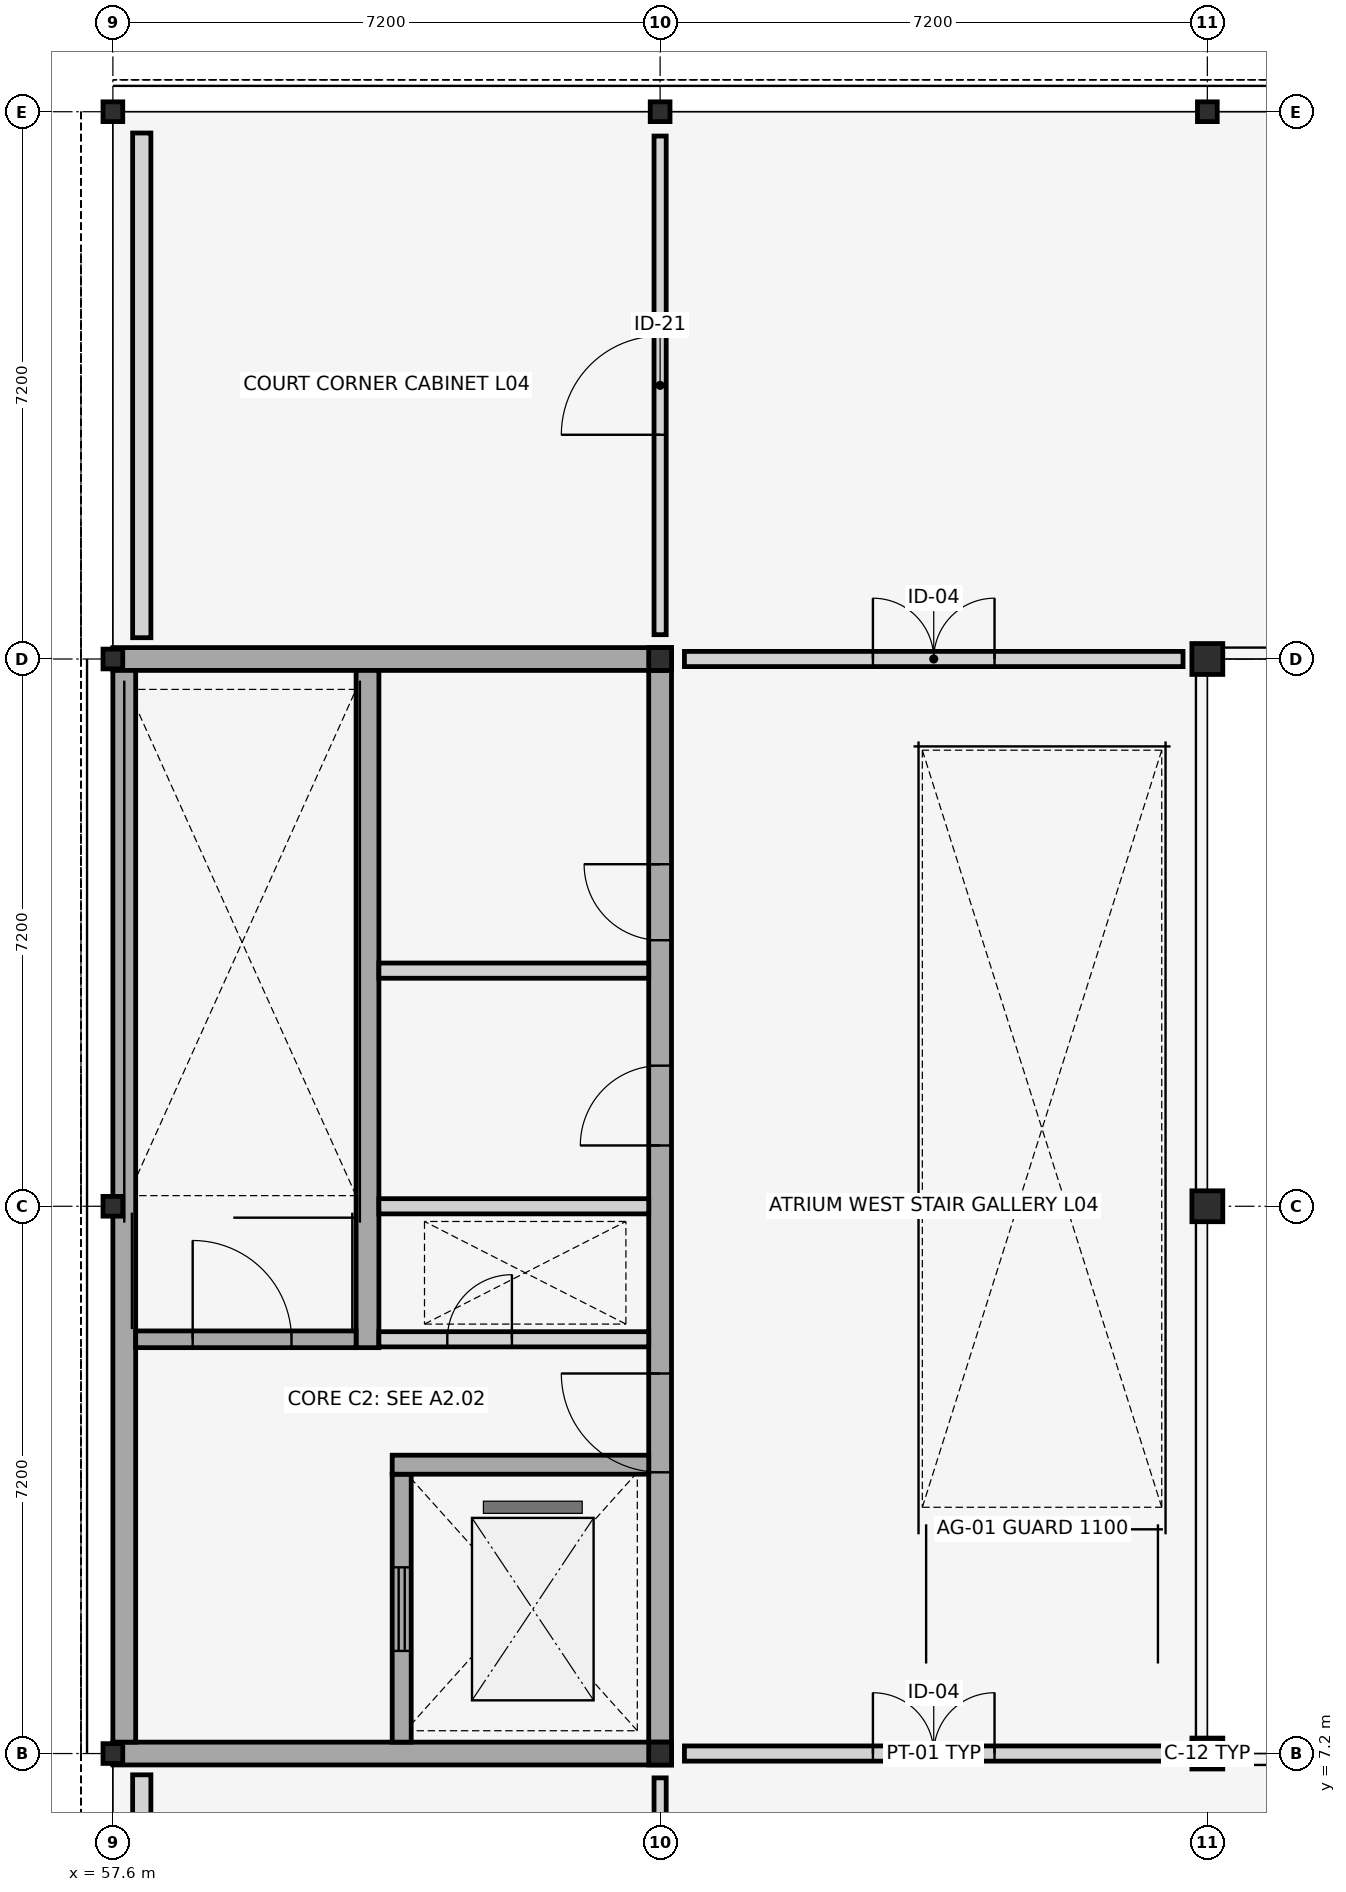
"""IFC4 building model, lengths in metres.
Left out: names, types, materials, properties, quantities, classifications, styles, units other than length and angle.
Written with IfcOpenShell. Run it as: python <this file> out.ifc"""

import sys

from ifc_helpers import new_model, si_unit, direction, frame, frame_2d, origin, origin_2d, place, context, subcontext, project, spatial, rectangle, hollow_circle, i_section, extrude, element, fill, save


model = new_model("IFC4")
c1 = context("Model", 3, precision=1e-05, world=origin(), true_north=direction((0.0, 1.0)))
c2 = subcontext(c1, "Body", "Model", "MODEL_VIEW")
j1 = project(units=[si_unit("LENGTHUNIT", "METRE"), si_unit("PLANEANGLEUNIT", "RADIAN")], contexts=[c1])
p1 = place(None, origin())
s1 = spatial("IfcSite", under=j1, at=p1, CompositionType="ELEMENT")
p2 = place(p1, origin())
s2 = spatial("IfcBuilding", under=s1, at=p2, CompositionType="ELEMENT")
p3 = place(p2, frame((0.0, 0.0, 17.1)))
s3 = spatial("IfcBuildingStorey", under=s2, at=p3, CompositionType="ELEMENT", Elevation=17.1)
for number, where, z_axis, x_axis in (
    (1, (57.6, 7.2, 0.0), (0.0, 0.0, 1.0), (0.0, 1.0, 0.0)),
    (2, (57.6, 14.4, 0.0), (0.0, 0.0, 1.0), (1.0, 0.0, 0.0)),
    (3, (57.6, 21.6, 0.0), (0.0, 0.0, 1.0), (0.0, 1.0, 0.0)),
    (4, (57.6, 28.8, 0.0), (0.0, 0.0, 1.0), (1.0, 0.0, 0.0)),
):
    element("IfcColumn", number, at=place(p3, frame(where, z_axis=z_axis, x_axis=x_axis)), inside=s3, PredefinedType="COLUMN", context=c2, shape_type="SweptSolid", body=[
        extrude(i_section(OverallWidth=0.26, OverallDepth=0.26, WebThickness=0.01, FlangeThickness=0.018, FilletRadius=0.024, at=origin_2d()), origin(), (0.0, 0.0, 1.0), 8.1),
    ])
for number, where, z_axis, x_axis in (
    (5, (64.8, 7.2, 0.0), (0.0, 0.0, 1.0), (1.0, 0.0, 0.0)),
    (6, (64.8, 21.6, 0.0), (0.0, 0.0, 1.0), (1.0, 0.0, 0.0)),
):
    element("IfcColumn", number, at=place(p3, frame(where, z_axis=z_axis, x_axis=x_axis)), inside=s3, PredefinedType="COLUMN", context=c2, shape_type="SweptSolid", body=[
        extrude(i_section(OverallWidth=0.3, OverallDepth=0.3, WebThickness=0.011, FlangeThickness=0.019, FilletRadius=0.027, at=origin_2d()), origin(), (0.0, 0.0, 1.0), 8.1),
    ])
p4 = place(p3, frame((64.8, 28.8, 0.0), z_axis=(0.0, 0.0, 1.0), x_axis=(0.0, 1.0, 0.0)))
e7 = element("IfcColumn", 7, at=p4, inside=s3, PredefinedType="COLUMN", context=c2, shape_type="SweptSolid", body=[
    extrude(i_section(OverallWidth=0.26, OverallDepth=0.26, WebThickness=0.01, FlangeThickness=0.018, FilletRadius=0.024, at=origin_2d()), origin(), (0.0, 0.0, 1.0), 8.1),
])
for number, where, z_axis, x_axis in (
    (8, (72.0, 7.2, 0.0), (0.0, 0.0, 1.0), (0.0, 1.0, 0.0)),
    (9, (72.0, 14.4, 0.0), (0.0, 0.0, 1.0), (1.0, 0.0, 0.0)),
    (10, (72.0, 21.6, 0.0), (0.0, 0.0, 1.0), (0.0, 1.0, 0.0)),
):
    element("IfcColumn", number, at=place(p3, frame(where, z_axis=z_axis, x_axis=x_axis)), inside=s3, PredefinedType="COLUMN", context=c2, shape_type="SweptSolid", body=[
        extrude(hollow_circle(Radius=0.203, WallThickness=0.016, at=origin_2d()), origin(), (0.0, 0.0, 1.0), 8.1),
    ])
p5 = place(p3, frame((72.0, 28.8, 0.0), z_axis=(0.0, 0.0, 1.0), x_axis=(1.0, 0.0, 0.0)))
e11 = element("IfcColumn", 11, at=p5, inside=s3, PredefinedType="COLUMN", context=c2, shape_type="SweptSolid", body=[
    extrude(i_section(OverallWidth=0.26, OverallDepth=0.26, WebThickness=0.01, FlangeThickness=0.018, FilletRadius=0.024, at=origin_2d()), origin(), (0.0, 0.0, 1.0), 8.1),
])
p6 = place(p3, frame((57.98, 28.52, 0.0), z_axis=(0.0, 0.0, 1.0), x_axis=(0.0, -1.0, 0.0)))
e12 = element("IfcWall", 12, at=p6, inside=s3, PredefinedType="STANDARD", context=c2, shape_type="SweptSolid", body=[
    extrude(rectangle(XDim=6.64, YDim=0.24, at=frame_2d((3.32, 0.0))), origin(), (0.0, 0.0, 1.0), 7.48),
])
p7 = place(p3, frame((57.98, 6.92, 0.0), z_axis=(0.0, 0.0, 1.0), x_axis=(0.0, -1.0, 0.0)))
e13 = element("IfcWall", 13, at=p7, inside=s3, PredefinedType="STANDARD", context=c2, shape_type="SweptSolid", body=[
    extrude(rectangle(XDim=6.64, YDim=0.24, at=frame_2d((3.32, 0.0))), origin(), (0.0, 0.0, 1.0), 7.48),
])
for number, where, z_axis, x_axis in (
    (14, (57.6, 7.2, 0.0), (0.0, 0.0, 1.0), (1.0, 0.0, 0.0)),
    (15, (57.6, 21.6, 0.0), (0.0, 0.0, 1.0), (1.0, 0.0, 0.0)),
):
    element("IfcWall", number, at=place(p3, frame(where, z_axis=z_axis, x_axis=x_axis)), inside=s3, PredefinedType="SHEAR", context=c2, shape_type="SweptSolid", body=[
        extrude(rectangle(XDim=7.35, YDim=0.3, at=frame_2d((3.675, 0.0))), origin(), (0.0, 0.0, 1.0), 7.88),
    ])
p8 = place(p3, frame((57.75, 7.35, 0.0), z_axis=(0.0, 0.0, 1.0), x_axis=(0.0, 1.0, 0.0)))
e16 = element("IfcWall", 16, at=p8, inside=s3, PredefinedType="SHEAR", context=c2, shape_type="SweptSolid", body=[
    extrude(rectangle(XDim=14.1, YDim=0.3, at=frame_2d((7.05, 0.0))), origin(), (0.0, 0.0, 1.0), 7.88),
])
p9 = place(p3, frame((64.8, 7.35, 0.0), z_axis=(0.0, 0.0, 1.0), x_axis=(0.0, 1.0, 0.0)))
e17 = element("IfcWall", 17, at=p9, inside=s3, PredefinedType="SHEAR", context=c2, shape_type="SweptSolid", body=[
    extrude(rectangle(XDim=14.1, YDim=0.3, at=frame_2d((7.05, 0.0))), origin(), (0.0, 0.0, 1.0), 7.88),
])
p10 = place(p9, frame((3.55, 0.0, 0.0)))
e18 = element("IfcOpeningElement", 18, at=p10, cuts=e17, PredefinedType="OPENING", context=c2, shape_type="SweptSolid", body=[
    extrude(rectangle(XDim=1.3, YDim=2.2, at=frame_2d((0.65, 1.1))), frame((0.0, 0.16, 0.0), z_axis=(0.0, -1.0, 0.0), x_axis=(1.0, 0.0, 0.0)), (0.0, 0.0, 1.0), 0.32),
])
p11 = place(p9, frame((7.85, 0.0, 0.0)))
e19 = element("IfcOpeningElement", 19, at=p11, cuts=e17, PredefinedType="OPENING", context=c2, shape_type="SweptSolid", body=[
    extrude(rectangle(XDim=1.05, YDim=2.15, at=frame_2d((0.525, 1.075))), frame((0.0, 0.16, 0.0), z_axis=(0.0, -1.0, 0.0), x_axis=(1.0, 0.0, 0.0)), (0.0, 0.0, 1.0), 0.32),
])
p12 = place(p9, frame((10.55, 0.0, 0.0)))
e20 = element("IfcOpeningElement", 20, at=p12, cuts=e17, PredefinedType="OPENING", context=c2, shape_type="SweptSolid", body=[
    extrude(rectangle(XDim=1.0, YDim=2.15, at=frame_2d((0.5, 1.075))), frame((0.0, 0.16, 0.0), z_axis=(0.0, -1.0, 0.0), x_axis=(1.0, 0.0, 0.0)), (0.0, 0.0, 1.0), 0.32),
])
p13 = place(p3, frame((61.4, 7.35, 0.0), z_axis=(0.0, 0.0, 1.0), x_axis=(0.0, 1.0, 0.0)))
e21 = element("IfcWall", 21, at=p13, inside=s3, PredefinedType="SHEAR", context=c2, shape_type="SweptSolid", body=[
    extrude(rectangle(XDim=3.525, YDim=0.25, at=frame_2d((1.762, 0.0))), origin(), (0.0, 0.0, 1.0), 7.88),
])
p14 = place(p13, frame((1.2, 0.0, 0.0)))
e22 = element("IfcOpeningElement", 22, at=p14, cuts=e21, PredefinedType="OPENING", context=c2, shape_type="SweptSolid", body=[
    extrude(rectangle(XDim=1.1, YDim=2.15, at=frame_2d((0.55, 1.075))), frame((0.0, 0.135, 0.0), z_axis=(0.0, -1.0, 0.0), x_axis=(1.0, 0.0, 0.0)), (0.0, 0.0, 1.0), 0.27),
])
p15 = place(p3, frame((60.95, 12.54, 0.0), z_axis=(0.0, 0.0, 1.0), x_axis=(0.0, 1.0, 0.0)))
e23 = element("IfcWall", 23, at=p15, inside=s3, PredefinedType="SHEAR", context=c2, shape_type="SweptSolid", body=[
    extrude(rectangle(XDim=8.91, YDim=0.3, at=frame_2d((4.455, 0.0))), origin(), (0.0, 0.0, 1.0), 7.88),
])
p16 = place(p3, frame((61.1, 12.65, 0.0), z_axis=(0.0, 0.0, 1.0), x_axis=(1.0, 0.0, 0.0)))
e24 = element("IfcWall", 24, at=p16, inside=s3, PredefinedType="PLUMBINGWALL", context=c2, shape_type="SweptSolid", body=[
    extrude(rectangle(XDim=3.55, YDim=0.2, at=frame_2d((1.775, 0.0))), origin(), (0.0, 0.0, 1.0), 7.3),
])
p17 = place(p16, frame((0.9, 0.0, 0.0)))
e25 = element("IfcOpeningElement", 25, at=p17, cuts=e24, PredefinedType="OPENING", context=c2, shape_type="SweptSolid", body=[
    extrude(rectangle(XDim=0.85, YDim=2.05, at=frame_2d((0.425, 1.025))), frame((0.0, 0.11, 0.0), z_axis=(0.0, -1.0, 0.0), x_axis=(1.0, 0.0, 0.0)), (0.0, 0.0, 1.0), 0.22),
])
p18 = place(p3, frame((57.9, 12.65, 0.0), z_axis=(0.0, 0.0, 1.0), x_axis=(1.0, 0.0, 0.0)))
e26 = element("IfcWall", 26, at=p18, inside=s3, PredefinedType="SHEAR", context=c2, shape_type="SweptSolid", body=[
    extrude(rectangle(XDim=2.9, YDim=0.22, at=frame_2d((1.45, 0.0))), origin(), (0.0, 0.0, 1.0), 7.88),
])
p19 = place(p18, frame((0.75, 0.0, 0.0)))
e27 = element("IfcOpeningElement", 27, at=p19, cuts=e26, PredefinedType="OPENING", context=c2, shape_type="SweptSolid", body=[
    extrude(rectangle(XDim=1.3, YDim=2.2, at=frame_2d((0.65, 1.1))), frame((0.0, 0.12, 0.0), z_axis=(0.0, -1.0, 0.0), x_axis=(1.0, 0.0, 0.0)), (0.0, 0.0, 1.0), 0.24),
])
p20 = place(p3, frame((61.275, 11.0, 0.0), z_axis=(0.0, 0.0, 1.0), x_axis=(1.0, 0.0, 0.0)))
e28 = element("IfcWall", 28, at=p20, inside=s3, PredefinedType="SHEAR", context=c2, shape_type="SweptSolid", body=[
    extrude(rectangle(XDim=3.375, YDim=0.25, at=frame_2d((1.688, 0.0))), origin(), (0.0, 0.0, 1.0), 7.88),
])
for number, where, z_axis, x_axis in (
    (29, (61.1, 14.4, 0.0), (0.0, 0.0, 1.0), (1.0, 0.0, 0.0)),
    (30, (61.1, 17.5, 0.0), (0.0, 0.0, 1.0), (1.0, 0.0, 0.0)),
):
    element("IfcWall", number, at=place(p3, frame(where, z_axis=z_axis, x_axis=x_axis)), inside=s3, PredefinedType="PLUMBINGWALL", context=c2, shape_type="SweptSolid", body=[
        extrude(rectangle(XDim=3.55, YDim=0.2, at=frame_2d((1.775, 0.0))), origin(), (0.0, 0.0, 1.0), 7.3),
    ])
p21 = place(p3, frame((65.12, 7.2, 0.0), z_axis=(0.0, 0.0, 1.0), x_axis=(1.0, 0.0, 0.0)))
e31 = element("IfcWall", 31, at=p21, inside=s3, PredefinedType="PARTITIONING", context=c2, shape_type="SweptSolid", body=[
    extrude(rectangle(XDim=6.56, YDim=0.2, at=frame_2d((3.28, 0.0))), origin(), (0.0, 0.0, 1.0), 7.05),
])
p22 = place(p21, frame((2.48, 0.0, 0.0)))
e32 = element("IfcOpeningElement", 32, at=p22, cuts=e31, PredefinedType="OPENING", context=c2, shape_type="SweptSolid", body=[
    extrude(rectangle(XDim=1.6, YDim=2.35, at=frame_2d((0.8, 1.175))), frame((0.0, 0.11, 0.0), z_axis=(0.0, -1.0, 0.0), x_axis=(1.0, 0.0, 0.0)), (0.0, 0.0, 1.0), 0.22),
])
p23 = place(p3, frame((65.12, 21.6, 0.0), z_axis=(0.0, 0.0, 1.0), x_axis=(1.0, 0.0, 0.0)))
e33 = element("IfcWall", 33, at=p23, inside=s3, PredefinedType="PARTITIONING", context=c2, shape_type="SweptSolid", body=[
    extrude(rectangle(XDim=6.56, YDim=0.2, at=frame_2d((3.28, 0.0))), origin(), (0.0, 0.0, 1.0), 7.05),
])
p24 = place(p23, frame((2.48, 0.0, 0.0)))
e34 = element("IfcOpeningElement", 34, at=p24, cuts=e33, PredefinedType="OPENING", context=c2, shape_type="SweptSolid", body=[
    extrude(rectangle(XDim=1.6, YDim=2.35, at=frame_2d((0.8, 1.175))), frame((0.0, 0.11, 0.0), z_axis=(0.0, -1.0, 0.0), x_axis=(1.0, 0.0, 0.0)), (0.0, 0.0, 1.0), 0.22),
])
p25 = place(p3, frame((64.8, 0.32, 0.0), z_axis=(0.0, 0.0, 1.0), x_axis=(0.0, 1.0, 0.0)))
e35 = element("IfcWall", 35, at=p25, inside=s3, PredefinedType="PARTITIONING", context=c2, shape_type="SweptSolid", body=[
    extrude(rectangle(XDim=6.56, YDim=0.16, at=frame_2d((3.28, 0.0))), origin(), (0.0, 0.0, 1.0), 7.05),
])
p26 = place(p25, frame((2.73, 0.0, 0.0)))
e36 = element("IfcOpeningElement", 36, at=p26, cuts=e35, PredefinedType="OPENING", context=c2, shape_type="SweptSolid", body=[
    extrude(rectangle(XDim=1.1, YDim=2.35, at=frame_2d((0.55, 1.175))), frame((0.0, 0.09, 0.0), z_axis=(0.0, -1.0, 0.0), x_axis=(1.0, 0.0, 0.0)), (0.0, 0.0, 1.0), 0.18),
])
p27 = place(p3, frame((64.8, 21.92, 0.0), z_axis=(0.0, 0.0, 1.0), x_axis=(0.0, 1.0, 0.0)))
e37 = element("IfcWall", 37, at=p27, inside=s3, PredefinedType="PARTITIONING", context=c2, shape_type="SweptSolid", body=[
    extrude(rectangle(XDim=6.56, YDim=0.16, at=frame_2d((3.28, 0.0))), origin(), (0.0, 0.0, 1.0), 7.05),
])
p28 = place(p27, frame((2.63, 0.0, 0.0)))
e38 = element("IfcOpeningElement", 38, at=p28, cuts=e37, PredefinedType="OPENING", context=c2, shape_type="SweptSolid", body=[
    extrude(rectangle(XDim=1.3, YDim=2.45, at=frame_2d((0.65, 1.225))), frame((0.0, 0.09, 0.0), z_axis=(0.0, -1.0, 0.0), x_axis=(1.0, 0.0, 0.0)), (0.0, 0.0, 1.0), 0.18),
])
p29 = place(p10, origin())
e39 = element("IfcDoor", 39, at=p29, inside=s3, OperationType="SINGLE_SWING_RIGHT", PredefinedType="DOOR", context=c2, shape_type="SweptSolid", body=[
    extrude(rectangle(XDim=1.3, YDim=2.2, at=frame_2d((0.65, 1.1))), frame((0.0, 0.025, 0.0), z_axis=(0.0, -1.0, 0.0), x_axis=(1.0, 0.0, 0.0)), (0.0, 0.0, 1.0), 0.05),
])
fill(e18, e39)
p30 = place(p11, origin())
e40 = element("IfcDoor", 40, at=p30, inside=s3, OperationType="SINGLE_SWING_LEFT", PredefinedType="DOOR", context=c2, shape_type="SweptSolid", body=[
    extrude(rectangle(XDim=1.05, YDim=2.15, at=frame_2d((0.525, 1.075))), frame((0.0, 0.025, 0.0), z_axis=(0.0, -1.0, 0.0), x_axis=(1.0, 0.0, 0.0)), (0.0, 0.0, 1.0), 0.05),
])
fill(e19, e40)
p31 = place(p12, origin())
e41 = element("IfcDoor", 41, at=p31, inside=s3, OperationType="SINGLE_SWING_RIGHT", PredefinedType="DOOR", context=c2, shape_type="SweptSolid", body=[
    extrude(rectangle(XDim=1.0, YDim=2.15, at=frame_2d((0.5, 1.075))), frame((0.0, 0.025, 0.0), z_axis=(0.0, -1.0, 0.0), x_axis=(1.0, 0.0, 0.0)), (0.0, 0.0, 1.0), 0.05),
])
fill(e20, e41)
p32 = place(p14, origin())
e42 = element("IfcDoor", 42, at=p32, inside=s3, OperationType="SLIDING_TO_LEFT", PredefinedType="DOOR", context=c2, shape_type="SweptSolid", body=[
    extrude(rectangle(XDim=1.1, YDim=2.15, at=frame_2d((0.55, 1.075))), frame((0.0, 0.025, 0.0), z_axis=(0.0, -1.0, 0.0), x_axis=(1.0, 0.0, 0.0)), (0.0, 0.0, 1.0), 0.05),
])
fill(e22, e42)
p33 = place(p17, origin())
e43 = element("IfcDoor", 43, at=p33, inside=s3, OperationType="SINGLE_SWING_RIGHT", PredefinedType="TRAPDOOR", context=c2, shape_type="SweptSolid", body=[
    extrude(rectangle(XDim=0.85, YDim=2.05, at=frame_2d((0.425, 1.025))), frame((0.0, 0.025, 0.0), z_axis=(0.0, -1.0, 0.0), x_axis=(1.0, 0.0, 0.0)), (0.0, 0.0, 1.0), 0.05),
])
fill(e25, e43)
p34 = place(p19, origin())
e44 = element("IfcDoor", 44, at=p34, inside=s3, OperationType="SINGLE_SWING_LEFT", PredefinedType="DOOR", context=c2, shape_type="SweptSolid", body=[
    extrude(rectangle(XDim=1.3, YDim=2.2, at=frame_2d((0.65, 1.1))), frame((0.0, 0.025, 0.0), z_axis=(0.0, -1.0, 0.0), x_axis=(1.0, 0.0, 0.0)), (0.0, 0.0, 1.0), 0.05),
])
fill(e27, e44)
p35 = place(p22, origin())
e45 = element("IfcDoor", 45, at=p35, inside=s3, OperationType="DOUBLE_DOOR_SINGLE_SWING", PredefinedType="DOOR", context=c2, shape_type="SweptSolid", body=[
    extrude(rectangle(XDim=1.6, YDim=2.35, at=frame_2d((0.8, 1.175))), frame((0.0, 0.025, 0.0), z_axis=(0.0, -1.0, 0.0), x_axis=(1.0, 0.0, 0.0)), (0.0, 0.0, 1.0), 0.05),
])
fill(e32, e45)
p36 = place(p24, origin())
e46 = element("IfcDoor", 46, at=p36, inside=s3, OperationType="DOUBLE_DOOR_SINGLE_SWING", PredefinedType="DOOR", context=c2, shape_type="SweptSolid", body=[
    extrude(rectangle(XDim=1.6, YDim=2.35, at=frame_2d((0.8, 1.175))), frame((0.0, 0.025, 0.0), z_axis=(0.0, -1.0, 0.0), x_axis=(1.0, 0.0, 0.0)), (0.0, 0.0, 1.0), 0.05),
])
fill(e34, e46)
p37 = place(p28, origin())
e47 = element("IfcDoor", 47, at=p37, inside=s3, OperationType="SINGLE_SWING_LEFT", PredefinedType="DOOR", context=c2, shape_type="SweptSolid", body=[
    extrude(rectangle(XDim=1.3, YDim=2.45, at=frame_2d((0.65, 1.225))), frame((0.0, 0.025, 0.0), z_axis=(0.0, -1.0, 0.0), x_axis=(1.0, 0.0, 0.0)), (0.0, 0.0, 1.0), 0.05),
])
fill(e38, e47)
save(model, sys.argv[1])
